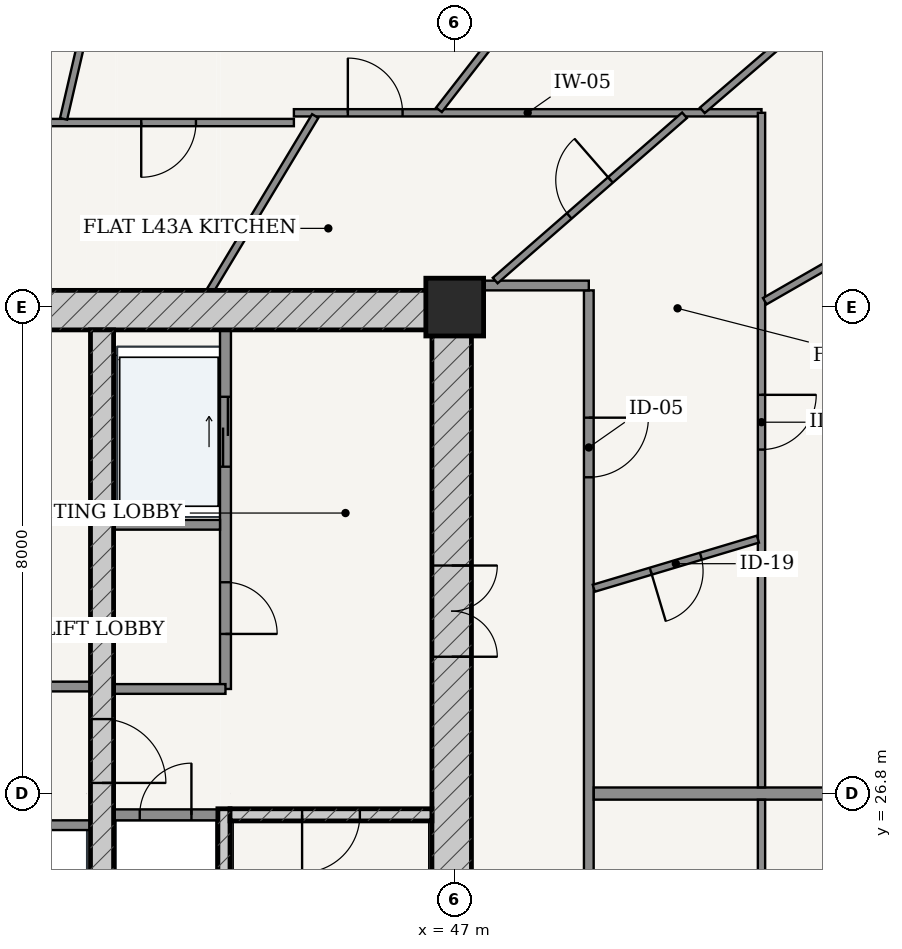
"""IFC4 building model, lengths in metres.
Left out: names, types, materials, properties, quantities, classifications, styles, units other than length and angle.
Written with IfcOpenShell. Run it as: python <this file> out.ifc"""

import sys

from ifc_helpers import new_model, si_unit, direction, frame, frame_2d, origin, origin_2d, place, context, subcontext, project, spatial, rectangle, extrude, source, transform, mapped, element, fill, save


model = new_model("IFC4")
c1 = context("Model", 3, precision=1e-05, world=origin(), true_north=direction((-0.2419218956, 0.970295726276)))
c2 = subcontext(c1, "Body", "Model", "MODEL_VIEW")
j1 = project(units=[si_unit("LENGTHUNIT", "METRE"), si_unit("PLANEANGLEUNIT", "RADIAN")], contexts=[c1])
p1 = place(None, origin())
s1 = spatial("IfcSite", under=j1, at=p1, CompositionType="ELEMENT")
p2 = place(p1, origin())
s2 = spatial("IfcBuilding", under=s1, at=p2, CompositionType="ELEMENT")
p3 = place(p2, frame((0.0, 0.0, 164.2)))
s3 = spatial("IfcBuildingStorey", under=s2, at=p3, CompositionType="ELEMENT", Elevation=164.2)
p4 = place(p3, frame((47.0, 34.8, 0.0), z_axis=(0.0, 0.0, 1.0), x_axis=(1.0, 0.0, 0.0)))
e1 = element("IfcColumn", 1, at=p4, inside=s3, PredefinedType="COLUMN", context=c2, shape_type="SweptSolid", body=[
    extrude(rectangle(XDim=0.95, YDim=0.95, at=origin_2d()), origin(), (0.0, 0.0, 1.0), 3.6),
])
p5 = place(p3, frame((28.725, 34.75, 0.0), z_axis=(0.0, 0.0, 1.0), x_axis=(1.0, 0.0, 0.0)))
e2 = element("IfcWall", 2, at=p5, inside=s3, PredefinedType="SHEAR", context=c2, shape_type="SweptSolid", body=[
    extrude(rectangle(XDim=18.55, YDim=0.65, at=frame_2d((9.275, 0.0))), origin(), (0.0, 0.0, 1.0), 3.33),
])
p6 = place(p3, frame((46.95, 19.175, 0.0), z_axis=(0.0, 0.0, 1.0), x_axis=(0.0, 1.0, 0.0)))
e3 = element("IfcWall", 3, at=p6, inside=s3, PredefinedType="SHEAR", context=c2, shape_type="SweptSolid", body=[
    extrude(rectangle(XDim=15.25, YDim=0.65, at=frame_2d((7.625, 0.0))), origin(), (0.0, 0.0, 1.0), 3.33),
])
p7 = place(p6, frame((9.875, 0.0, 0.0)))
e4 = element("IfcOpeningElement", 4, at=p7, cuts=e3, PredefinedType="OPENING", context=c2, shape_type="SweptSolid", body=[
    extrude(rectangle(XDim=1.5, YDim=2.2, at=frame_2d((0.75, 1.1))), frame((0.0, 0.335, 0.0), z_axis=(0.0, -1.0, 0.0), x_axis=(1.0, 0.0, 0.0)), (0.0, 0.0, 1.0), 0.67),
])
p8 = place(p3, frame((43.205, 19.175, 0.0), z_axis=(0.0, 0.0, 1.0), x_axis=(0.0, 1.0, 0.0)))
e5 = element("IfcWall", 5, at=p8, inside=s3, PredefinedType="SOLIDWALL", context=c2, shape_type="SweptSolid", body=[
    extrude(rectangle(XDim=7.375, YDim=0.2, at=frame_2d((3.688, 0.0))), origin(), (0.0, 0.0, 1.0), 3.33),
])
p9 = place(p3, frame((43.305, 26.45, 0.0), z_axis=(0.0, 0.0, 1.0), x_axis=(1.0, 0.0, 0.0)))
e6 = element("IfcWall", 6, at=p9, inside=s3, PredefinedType="SOLIDWALL", context=c2, shape_type="SweptSolid", body=[
    extrude(rectangle(XDim=3.32, YDim=0.2, at=frame_2d((1.66, 0.0))), origin(), (0.0, 0.0, 1.0), 3.33),
])
p10 = place(p9, frame((1.185, 0.0, 0.0)))
e7 = element("IfcOpeningElement", 7, at=p10, cuts=e6, PredefinedType="OPENING", context=c2, shape_type="SweptSolid", body=[
    extrude(rectangle(XDim=0.95, YDim=2.15, at=frame_2d((0.475, 1.075))), frame((0.0, 0.11, 0.0), z_axis=(0.0, -1.0, 0.0), x_axis=(1.0, 0.0, 0.0)), (0.0, 0.0, 1.0), 0.22),
])
p11 = place(p3, frame((41.2, 19.175, 0.0), z_axis=(0.0, 0.0, 1.0), x_axis=(0.0, 1.0, 0.0)))
e8 = element("IfcWall", 8, at=p11, inside=s3, PredefinedType="SHEAR", context=c2, shape_type="SweptSolid", body=[
    extrude(rectangle(XDim=15.25, YDim=0.38, at=frame_2d((7.625, 0.0))), origin(), (0.0, 0.0, 1.0), 3.33),
])
p12 = place(p11, frame((7.8, 0.0, 0.0)))
e9 = element("IfcOpeningElement", 9, at=p12, cuts=e8, PredefinedType="OPENING", context=c2, shape_type="SweptSolid", body=[
    extrude(rectangle(XDim=1.05, YDim=2.15, at=frame_2d((0.525, 1.075))), frame((0.0, 0.2, 0.0), z_axis=(0.0, -1.0, 0.0), x_axis=(1.0, 0.0, 0.0)), (0.0, 0.0, 1.0), 0.4),
])
p13 = place(p3, frame((41.39, 26.45, 0.0), z_axis=(0.0, 0.0, 1.0), x_axis=(1.0, 0.0, 0.0)))
e10 = element("IfcWall", 10, at=p13, inside=s3, PredefinedType="PARTITIONING", context=c2, shape_type="SweptSolid", body=[
    extrude(rectangle(XDim=1.71, YDim=0.18, at=frame_2d((0.855, 0.0))), origin(), (0.0, 0.0, 1.0), 3.33),
])
p14 = place(p13, frame((0.43, 0.0, 0.0)))
e11 = element("IfcOpeningElement", 11, at=p14, cuts=e10, PredefinedType="OPENING", context=c2, shape_type="SweptSolid", body=[
    extrude(rectangle(XDim=0.85, YDim=2.1, at=frame_2d((0.425, 1.05))), frame((0.0, 0.1, 0.0), z_axis=(0.0, -1.0, 0.0), x_axis=(1.0, 0.0, 0.0)), (0.0, 0.0, 1.0), 0.2),
])
p15 = place(p3, frame((43.23, 28.52, 0.0), z_axis=(0.0, 0.0, 1.0), x_axis=(0.0, 1.0, 0.0)))
e12 = element("IfcWall", 12, at=p15, inside=s3, PredefinedType="PARTITIONING", context=c2, shape_type="SweptSolid", body=[
    extrude(rectangle(XDim=5.905, YDim=0.18, at=frame_2d((2.953, 0.0))), origin(), (0.0, 0.0, 1.0), 3.33),
])
p16 = place(p15, frame((0.905, 0.0, 0.0)))
e13 = element("IfcOpeningElement", 13, at=p16, cuts=e12, PredefinedType="OPENING", context=c2, shape_type="SweptSolid", body=[
    extrude(rectangle(XDim=0.85, YDim=2.1, at=frame_2d((0.425, 1.05))), frame((0.0, 0.1, 0.0), z_axis=(0.0, -1.0, 0.0), x_axis=(1.0, 0.0, 0.0)), (0.0, 0.0, 1.0), 0.2),
])
p17 = place(p15, frame((3.655, 0.0, 0.0)))
e14 = element("IfcOpeningElement", 14, at=p17, cuts=e12, PredefinedType="OPENING", context=c2, shape_type="SweptSolid", body=[
    extrude(rectangle(XDim=1.15, YDim=2.2, at=frame_2d((0.575, 1.1))), frame((0.0, 0.1, 0.0), z_axis=(0.0, -1.0, 0.0), x_axis=(1.0, 0.0, 0.0)), (0.0, 0.0, 1.0), 0.2),
])
p18 = place(p3, frame((41.39, 31.22, 0.0), z_axis=(0.0, 0.0, 1.0), x_axis=(1.0, 0.0, 0.0)))
e15 = element("IfcWall", 15, at=p18, inside=s3, PredefinedType="PARTITIONING", context=c2, shape_type="SweptSolid", body=[
    extrude(rectangle(XDim=1.75, YDim=0.16, at=frame_2d((0.875, 0.0))), origin(), (0.0, 0.0, 1.0), 3.33),
])
p19 = place(p3, frame((41.39, 28.52, 0.0), z_axis=(0.0, 0.0, 1.0), x_axis=(1.0, 0.0, 0.0)))
e16 = element("IfcWall", 16, at=p19, inside=s3, PredefinedType="PARTITIONING", context=c2, shape_type="SweptSolid", body=[
    extrude(rectangle(XDim=1.84, YDim=0.16, at=frame_2d((0.92, 0.0))), origin(), (0.0, 0.0, 1.0), 3.33),
])
p20 = place(p3, frame((34.99, 28.56, 0.0), z_axis=(0.0, 0.0, 1.0), x_axis=(1.0, 0.0, 0.0)))
e17 = element("IfcWall", 17, at=p20, inside=s3, PredefinedType="PARTITIONING", context=c2, shape_type="SweptSolid", body=[
    extrude(rectangle(XDim=6.02, YDim=0.16, at=frame_2d((3.01, 0.0))), origin(), (0.0, 0.0, 1.0), 3.33),
])
p21 = place(p20, frame((2.585, 0.0, 0.0)))
e18 = element("IfcOpeningElement", 18, at=p21, cuts=e17, PredefinedType="OPENING", context=c2, shape_type="SweptSolid", body=[
    extrude(rectangle(XDim=0.85, YDim=2.1, at=frame_2d((0.425, 1.05))), frame((0.0, 0.09, 0.0), z_axis=(0.0, -1.0, 0.0), x_axis=(1.0, 0.0, 0.0)), (0.0, 0.0, 1.0), 0.18),
])
p22 = place(p3, frame((34.99, 26.28, 0.0), z_axis=(0.0, 0.0, 1.0), x_axis=(1.0, 0.0, 0.0)))
e19 = element("IfcWall", 19, at=p22, inside=s3, PredefinedType="PARTITIONING", context=c2, shape_type="SweptSolid", body=[
    extrude(rectangle(XDim=6.02, YDim=0.16, at=frame_2d((3.01, 0.0))), origin(), (0.0, 0.0, 1.0), 3.33),
])
p23 = place(p22, frame((0.225, 0.0, 0.0)))
e20 = element("IfcOpeningElement", 20, at=p23, cuts=e19, PredefinedType="OPENING", context=c2, shape_type="SweptSolid", body=[
    extrude(rectangle(XDim=1.1, YDim=2.2, at=frame_2d((0.55, 1.1))), frame((0.0, 0.09, 0.0), z_axis=(0.0, -1.0, 0.0), x_axis=(1.0, 0.0, 0.0)), (0.0, 0.0, 1.0), 0.18),
])
p24 = place(p22, frame((1.705, 0.0, 0.0)))
e21 = element("IfcOpeningElement", 21, at=p24, cuts=e19, PredefinedType="OPENING", context=c2, shape_type="SweptSolid", body=[
    extrude(rectangle(XDim=1.1, YDim=2.2, at=frame_2d((0.55, 1.1))), frame((0.0, 0.09, 0.0), z_axis=(0.0, -1.0, 0.0), x_axis=(1.0, 0.0, 0.0)), (0.0, 0.0, 1.0), 0.18),
])
p25 = place(p3, frame((49.205, 16.675, 0.0), z_axis=(0.0, 0.0, 1.0), x_axis=(0.0, 1.0, 0.0)))
e22 = element("IfcWall", 22, at=p25, inside=s3, PredefinedType="PARTITIONING", context=c2, shape_type="SweptSolid", body=[
    extrude(rectangle(XDim=18.4, YDim=0.16, at=frame_2d((9.2, 0.0))), origin(), (0.0, 0.0, 1.0), 2.776),
])
p26 = place(p25, frame((15.326, 0.0, 0.0)))
e23 = element("IfcOpeningElement", 23, at=p26, cuts=e22, PredefinedType="OPENING", context=c2, shape_type="SweptSolid", body=[
    extrude(rectangle(XDim=0.98, YDim=2.2, at=frame_2d((0.49, 1.1))), frame((0.0, 0.09, 0.0), z_axis=(0.0, -1.0, 0.0), x_axis=(1.0, 0.0, 0.0)), (0.0, 0.0, 1.0), 0.18),
])
p27 = place(p3, frame((47.275, 35.155, 0.0), z_axis=(0.0, 0.0, 1.0), x_axis=(1.0, 0.0, 0.0)))
e24 = element("IfcWall", 24, at=p27, inside=s3, PredefinedType="PARTITIONING", context=c2, shape_type="SweptSolid", body=[
    extrude(rectangle(XDim=1.93, YDim=0.16, at=frame_2d((0.965, 0.0))), origin(), (0.0, 0.0, 1.0), 2.776),
])
p28 = place(p3, frame((49.287, 26.8, 0.0), z_axis=(0.0, 0.0, 1.0), x_axis=(1.0, 0.0, 0.0)))
e25 = element("IfcWall", 25, at=p28, inside=s3, PredefinedType="PARTITIONING", context=c2, shape_type="SweptSolid", body=[
    extrude(rectangle(XDim=12.853, YDim=0.2, at=frame_2d((6.426, 0.0))), origin(), (0.0, 0.0, 1.0), 2.846),
])
p29 = place(p3, frame((38.102, 37.835, 0.0), z_axis=(0.0, 0.0, 1.0), x_axis=(1.0, 0.0, 0.0)))
e26 = element("IfcWall", 26, at=p29, inside=s3, PredefinedType="PARTITIONING", context=c2, shape_type="SweptSolid", body=[
    extrude(rectangle(XDim=6.253, YDim=0.12, at=frame_2d((3.126, 0.0))), origin(), (0.0, 0.0, 1.0), 2.776),
])
p30 = place(p29, frame((3.742, 0.0, 0.0)))
e27 = element("IfcOpeningElement", 27, at=p30, cuts=e26, PredefinedType="OPENING", context=c2, shape_type="SweptSolid", body=[
    extrude(rectangle(XDim=0.9, YDim=2.15, at=frame_2d((0.45, 1.075))), frame((0.0, 0.07, 0.0), z_axis=(0.0, -1.0, 0.0), x_axis=(1.0, 0.0, 0.0)), (0.0, 0.0, 1.0), 0.14),
])
p31 = place(p3, frame((44.355, 37.995, 0.0), z_axis=(0.0, 0.0, 1.0), x_axis=(1.0, 0.0, 0.0)))
e28 = element("IfcWall", 28, at=p31, inside=s3, PredefinedType="PARTITIONING", context=c2, shape_type="SweptSolid", body=[
    extrude(rectangle(XDim=7.69, YDim=0.12, at=frame_2d((3.845, 0.0))), origin(), (0.0, 0.0, 1.0), 2.776),
])
p32 = place(p31, frame((0.887, 0.0, 0.0)))
e29 = element("IfcOpeningElement", 29, at=p32, cuts=e28, PredefinedType="OPENING", context=c2, shape_type="SweptSolid", body=[
    extrude(rectangle(XDim=0.9, YDim=2.15, at=frame_2d((0.45, 1.075))), frame((0.0, 0.07, 0.0), z_axis=(0.0, -1.0, 0.0), x_axis=(1.0, 0.0, 0.0)), (0.0, 0.0, 1.0), 0.14),
])
p33 = place(p3, frame((52.045, 37.995, 0.0), z_axis=(0.0, 0.0, 1.0), x_axis=(0.0, -1.0, 0.0)))
e30 = element("IfcWall", 30, at=p33, inside=s3, PredefinedType="PARTITIONING", context=c2, shape_type="SweptSolid", body=[
    extrude(rectangle(XDim=11.093, YDim=0.12, at=frame_2d((5.546, 0.0))), origin(), (0.0, 0.0, 1.0), 2.776),
])
p34 = place(p33, frame((4.638, 0.0, 0.0)))
e31 = element("IfcOpeningElement", 31, at=p34, cuts=e30, PredefinedType="OPENING", context=c2, shape_type="SweptSolid", body=[
    extrude(rectangle(XDim=0.9, YDim=2.15, at=frame_2d((0.45, 1.075))), frame((0.0, 0.07, 0.0), z_axis=(0.0, -1.0, 0.0), x_axis=(1.0, 0.0, 0.0)), (0.0, 0.0, 1.0), 0.14),
])
p35 = place(p3, frame((52.099, 34.897, 0.0), z_axis=(0.0, 0.0, 1.0), x_axis=(0.867170536447, 0.498011305813, 0.0)))
e32 = element("IfcWall", 32, at=p35, inside=s3, PredefinedType="PARTITIONING", context=c2, shape_type="SweptSolid", body=[
    extrude(rectangle(XDim=6.834, YDim=0.12, at=frame_2d((3.417, 0.0))), origin(), (0.0, 0.0, 1.0), 2.776),
])
p36 = place(p35, frame((1.969, 0.0, 0.0)))
e33 = element("IfcOpeningElement", 33, at=p36, cuts=e32, PredefinedType="OPENING", context=c2, shape_type="SweptSolid", body=[
    extrude(rectangle(XDim=0.9, YDim=2.15, at=frame_2d((0.45, 1.075))), frame((0.0, 0.07, 0.0), z_axis=(0.0, -1.0, 0.0), x_axis=(1.0, 0.0, 0.0)), (0.0, 0.0, 1.0), 0.14),
])
p37 = place(p3, frame((51.072, 38.035, 0.0), z_axis=(0.0, 0.0, 1.0), x_axis=(0.758368609512, 0.65182593697, 0.0)))
e34 = element("IfcWall", 34, at=p37, inside=s3, PredefinedType="PARTITIONING", context=c2, shape_type="SweptSolid", body=[
    extrude(rectangle(XDim=5.263, YDim=0.12, at=frame_2d((2.632, 0.0))), origin(), (0.0, 0.0, 1.0), 2.846),
])
p38 = place(p3, frame((46.741, 38.044, 0.0), z_axis=(0.0, 0.0, 1.0), x_axis=(0.613770587295, 0.789484430607, 0.0)))
e35 = element("IfcWall", 35, at=p38, inside=s3, PredefinedType="PARTITIONING", context=c2, shape_type="SweptSolid", body=[
    extrude(rectangle(XDim=7.556, YDim=0.12, at=frame_2d((3.778, 0.0))), origin(), (0.0, 0.0, 1.0), 2.776),
])
p39 = place(p38, frame((2.325, 0.0, 0.0)))
e36 = element("IfcOpeningElement", 36, at=p39, cuts=e35, PredefinedType="OPENING", context=c2, shape_type="SweptSolid", body=[
    extrude(rectangle(XDim=0.9, YDim=2.15, at=frame_2d((0.45, 1.075))), frame((0.0, 0.07, 0.0), z_axis=(0.0, -1.0, 0.0), x_axis=(1.0, 0.0, 0.0)), (0.0, 0.0, 1.0), 0.14),
])
p40 = place(p3, frame((40.568, 37.896, 0.0), z_axis=(0.0, 0.0, 1.0), x_axis=(0.225452174141, 0.974254236416, 0.0)))
e37 = element("IfcWall", 37, at=p40, inside=s3, PredefinedType="PARTITIONING", context=c2, shape_type="SweptSolid", body=[
    extrude(rectangle(XDim=9.446, YDim=0.12, at=frame_2d((4.723, 0.0))), origin(), (0.0, 0.0, 1.0), 2.776),
])
p41 = place(p40, frame((3.264, 0.0, 0.0)))
e38 = element("IfcOpeningElement", 38, at=p41, cuts=e37, PredefinedType="OPENING", context=c2, shape_type="SweptSolid", body=[
    extrude(rectangle(XDim=0.9, YDim=2.15, at=frame_2d((0.45, 1.075))), frame((0.0, 0.07, 0.0), z_axis=(0.0, -1.0, 0.0), x_axis=(1.0, 0.0, 0.0)), (0.0, 0.0, 1.0), 0.14),
])
p42 = place(p3, frame((49.287, 30.177, 0.0), z_axis=(0.0, 0.0, 1.0), x_axis=(0.958045462778, 0.28661627876, 0.0)))
e39 = element("IfcWall", 39, at=p42, inside=s3, PredefinedType="PARTITIONING", context=c2, shape_type="SweptSolid", body=[
    extrude(rectangle(XDim=2.817, YDim=0.12, at=frame_2d((1.408, 0.0))), origin(), (0.0, 0.0, 1.0), 3.33),
])
p43 = place(p42, frame((0.979, 0.0, 0.0)))
e40 = element("IfcOpeningElement", 40, at=p43, cuts=e39, PredefinedType="OPENING", context=c2, shape_type="SweptSolid", body=[
    extrude(rectangle(XDim=0.86, YDim=2.15, at=frame_2d((0.43, 1.075))), frame((0.0, 0.07, 0.0), z_axis=(0.0, -1.0, 0.0), x_axis=(1.0, 0.0, 0.0)), (0.0, 0.0, 1.0), 0.14),
])
p44 = place(p3, frame((47.665, 35.236, 0.0), z_axis=(0.0, 0.0, 1.0), x_axis=(0.753384754287, 0.657579966246, 0.0)))
e41 = element("IfcWall", 41, at=p44, inside=s3, PredefinedType="PARTITIONING", context=c2, shape_type="SweptSolid", body=[
    extrude(rectangle(XDim=4.133, YDim=0.12, at=frame_2d((2.067, 0.0))), origin(), (0.0, 0.0, 1.0), 3.005),
])
p45 = place(p44, frame((1.617, 0.0, 0.0)))
e42 = element("IfcOpeningElement", 42, at=p45, cuts=e41, PredefinedType="OPENING", context=c2, shape_type="SweptSolid", body=[
    extrude(rectangle(XDim=0.9, YDim=2.15, at=frame_2d((0.45, 1.075))), frame((0.0, 0.07, 0.0), z_axis=(0.0, -1.0, 0.0), x_axis=(1.0, 0.0, 0.0)), (0.0, 0.0, 1.0), 0.14),
])
p46 = place(p3, frame((42.98, 35.075, 0.0), z_axis=(0.0, 0.0, 1.0), x_axis=(0.515686235332, 0.856777512946, 0.0)))
e43 = element("IfcWall", 43, at=p46, inside=s3, PredefinedType="PARTITIONING", context=c2, shape_type="SweptSolid", body=[
    extrude(rectangle(XDim=3.346, YDim=0.12, at=frame_2d((1.673, 0.0))), origin(), (0.0, 0.0, 1.0), 3.33),
])
p47 = place(p3, frame((52.045, 26.698, 0.0), z_axis=(0.0, 0.0, 1.0), x_axis=(0.0, -1.0, 0.0)))
e44 = element("IfcWall", 44, at=p47, inside=s3, PredefinedType="PARTITIONING", context=c2, shape_type="SweptSolid", body=[
    extrude(rectangle(XDim=12.943, YDim=0.12, at=frame_2d((6.472, 0.0))), origin(), (0.0, 0.0, 1.0), 2.776),
])
p48 = place(p47, frame((8.503, 0.0, 0.0)))
e45 = element("IfcOpeningElement", 45, at=p48, cuts=e44, PredefinedType="OPENING", context=c2, shape_type="SweptSolid", body=[
    extrude(rectangle(XDim=0.9, YDim=2.15, at=frame_2d((0.45, 1.075))), frame((0.0, 0.07, 0.0), z_axis=(0.0, -1.0, 0.0), x_axis=(1.0, 0.0, 0.0)), (0.0, 0.0, 1.0), 0.14),
])
m1 = source(origin(), c2, "Body", "SweptSolid", [
    extrude(rectangle(XDim=1.5, YDim=2.2, at=frame_2d((0.75, 1.1))), frame((0.0, 0.025, 0.0), z_axis=(0.0, -1.0, 0.0), x_axis=(1.0, 0.0, 0.0)), (0.0, 0.0, 1.0), 0.05),
])
p49 = place(p7, frame((1.5, 0.0, 0.0), z_axis=(0.0, 0.0, 1.0), x_axis=(-1.0, 0.0, 0.0)))
e46 = element("IfcDoor", 46, at=p49, inside=s3, OperationType="DOUBLE_DOOR_SINGLE_SWING", PredefinedType="DOOR", context=c2, shape_type="MappedRepresentation", body=[
    mapped(m1, transform((0.0, 0.0, 0.0), scale=1.0)),
])
fill(e4, e46)
m2 = source(origin(), c2, "Body", "SweptSolid", [
    extrude(rectangle(XDim=1.05, YDim=2.15, at=frame_2d((0.525, 1.075))), frame((0.0, 0.025, 0.0), z_axis=(0.0, -1.0, 0.0), x_axis=(1.0, 0.0, 0.0)), (0.0, 0.0, 1.0), 0.05),
])
p50 = place(p12, frame((1.05, 0.0, 0.0), z_axis=(0.0, 0.0, 1.0), x_axis=(-1.0, 0.0, 0.0)))
e47 = element("IfcDoor", 47, at=p50, inside=s3, OperationType="SINGLE_SWING_RIGHT", PredefinedType="DOOR", context=c2, shape_type="MappedRepresentation", body=[
    mapped(m2, transform((0.0, 0.0, 0.0), scale=1.0)),
])
fill(e9, e47)
m3 = source(origin(), c2, "Body", "SweptSolid", [
    extrude(rectangle(XDim=0.95, YDim=2.15, at=frame_2d((0.475, 1.075))), frame((0.0, 0.025, 0.0), z_axis=(0.0, -1.0, 0.0), x_axis=(1.0, 0.0, 0.0)), (0.0, 0.0, 1.0), 0.05),
])
p51 = place(p10, frame((0.95, 0.0, 0.0), z_axis=(0.0, 0.0, 1.0), x_axis=(-1.0, 0.0, 0.0)))
e48 = element("IfcDoor", 48, at=p51, inside=s3, OperationType="SINGLE_SWING_RIGHT", PredefinedType="DOOR", context=c2, shape_type="MappedRepresentation", body=[
    mapped(m3, transform((0.0, 0.0, 0.0), scale=1.0)),
])
fill(e7, e48)
m4 = source(origin(), c2, "Body", "SweptSolid", [
    extrude(rectangle(XDim=0.85, YDim=2.1, at=frame_2d((0.425, 1.05))), frame((0.0, 0.025, 0.0), z_axis=(0.0, -1.0, 0.0), x_axis=(1.0, 0.0, 0.0)), (0.0, 0.0, 1.0), 0.05),
])
p52 = place(p14, origin())
e49 = element("IfcDoor", 49, at=p52, inside=s3, OperationType="SINGLE_SWING_RIGHT", PredefinedType="DOOR", context=c2, shape_type="MappedRepresentation", body=[
    mapped(m4, transform((0.0, 0.0, 0.0), scale=1.0)),
])
fill(e11, e49)
p53 = place(p16, frame((0.85, 0.0, 0.0), z_axis=(0.0, 0.0, 1.0), x_axis=(-1.0, 0.0, 0.0)))
e50 = element("IfcDoor", 50, at=p53, inside=s3, OperationType="SINGLE_SWING_RIGHT", PredefinedType="DOOR", context=c2, shape_type="MappedRepresentation", body=[
    mapped(m4, transform((0.0, 0.0, 0.0), scale=1.0)),
])
fill(e13, e50)
m5 = source(origin(), c2, "Body", "SweptSolid", [
    extrude(rectangle(XDim=1.15, YDim=2.2, at=frame_2d((0.575, 1.1))), frame((0.0, 0.025, 0.0), z_axis=(0.0, -1.0, 0.0), x_axis=(1.0, 0.0, 0.0)), (0.0, 0.0, 1.0), 0.05),
])
p54 = place(p17, origin())
e51 = element("IfcDoor", 51, at=p54, inside=s3, OperationType="DOUBLE_DOOR_SLIDING", PredefinedType="DOOR", context=c2, shape_type="MappedRepresentation", body=[
    mapped(m5, transform((0.0, 0.0, 0.0), scale=1.0)),
])
fill(e14, e51)
m6 = source(origin(), c2, "Body", "SweptSolid", [
    extrude(rectangle(XDim=0.98, YDim=2.2, at=frame_2d((0.49, 1.1))), frame((0.0, 0.025, 0.0), z_axis=(0.0, -1.0, 0.0), x_axis=(1.0, 0.0, 0.0)), (0.0, 0.0, 1.0), 0.05),
])
p55 = place(p26, frame((0.98, 0.0, 0.0), z_axis=(0.0, 0.0, 1.0), x_axis=(-1.0, 0.0, 0.0)))
e52 = element("IfcDoor", 52, at=p55, inside=s3, OperationType="SINGLE_SWING_LEFT", PredefinedType="DOOR", context=c2, shape_type="MappedRepresentation", body=[
    mapped(m6, transform((0.0, 0.0, 0.0), scale=1.0)),
])
fill(e23, e52)
m7 = source(origin(), c2, "Body", "SweptSolid", [
    extrude(rectangle(XDim=0.86, YDim=2.15, at=frame_2d((0.43, 1.075))), frame((0.0, 0.025, 0.0), z_axis=(0.0, -1.0, 0.0), x_axis=(1.0, 0.0, 0.0)), (0.0, 0.0, 1.0), 0.05),
])
p56 = place(p43, frame((0.86, 0.0, 0.0), z_axis=(0.0, 0.0, 1.0), x_axis=(-1.0, 0.0, 0.0)))
e53 = element("IfcDoor", 53, at=p56, inside=s3, OperationType="SINGLE_SWING_RIGHT", PredefinedType="DOOR", context=c2, shape_type="MappedRepresentation", body=[
    mapped(m7, transform((0.0, 0.0, 0.0), scale=1.0)),
])
fill(e40, e53)
m8 = source(origin(), c2, "Body", "SweptSolid", [
    extrude(rectangle(XDim=0.9, YDim=2.15, at=frame_2d((0.45, 1.075))), frame((0.0, 0.025, 0.0), z_axis=(0.0, -1.0, 0.0), x_axis=(1.0, 0.0, 0.0)), (0.0, 0.0, 1.0), 0.05),
])
p57 = place(p34, origin())
e54 = element("IfcDoor", 54, at=p57, inside=s3, OperationType="SINGLE_SWING_LEFT", PredefinedType="DOOR", context=c2, shape_type="MappedRepresentation", body=[
    mapped(m8, transform((0.0, 0.0, 0.0), scale=1.0)),
])
fill(e31, e54)
p58 = place(p45, origin())
e55 = element("IfcDoor", 55, at=p58, inside=s3, OperationType="SINGLE_SWING_RIGHT", PredefinedType="DOOR", context=c2, shape_type="MappedRepresentation", body=[
    mapped(m8, transform((0.0, 0.0, 0.0), scale=1.0)),
])
fill(e42, e55)
p59 = place(p32, origin())
e56 = element("IfcDoor", 56, at=p59, inside=s3, OperationType="SINGLE_SWING_LEFT", PredefinedType="DOOR", context=c2, shape_type="MappedRepresentation", body=[
    mapped(m8, transform((0.0, 0.0, 0.0), scale=1.0)),
])
fill(e29, e56)
p60 = place(p30, frame((0.9, 0.0, 0.0), z_axis=(0.0, 0.0, 1.0), x_axis=(-1.0, 0.0, 0.0)))
e57 = element("IfcDoor", 57, at=p60, inside=s3, OperationType="SINGLE_SWING_RIGHT", PredefinedType="DOOR", context=c2, shape_type="MappedRepresentation", body=[
    mapped(m8, transform((0.0, 0.0, 0.0), scale=1.0)),
])
fill(e27, e57)
save(model, sys.argv[1])
